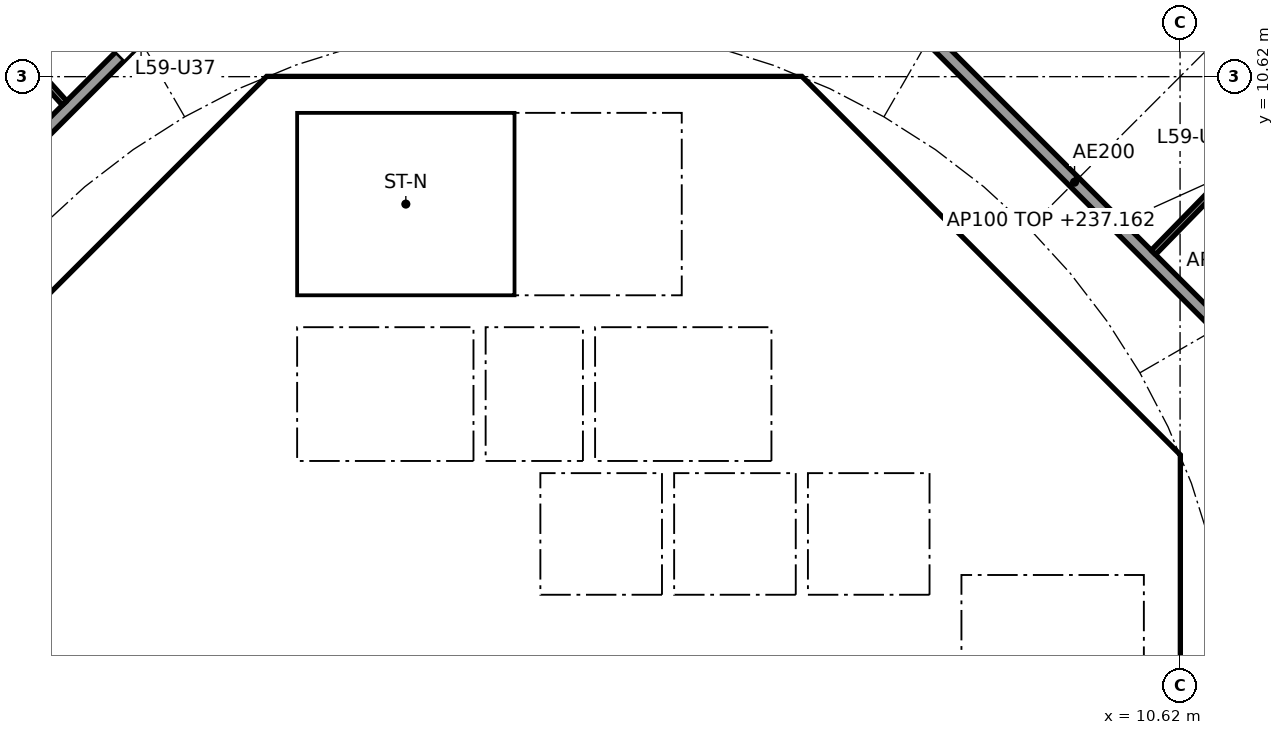
"""IFC4 building model, lengths in metres.
Left out: names, types, materials, properties, quantities, classifications, styles, units other than length and angle.
Written with IfcOpenShell. Run it as: python <this file> out.ifc"""

import sys

from ifc_helpers import new_model, si_unit, direction, frame, frame_2d, origin, place, context, subcontext, project, spatial, polyline, rectangle, outline, extrude, element, fill, save


model = new_model("IFC4")
c1 = context("Model", 3, precision=1e-05, world=origin(), true_north=direction((0.0, 1.0)))
c2 = subcontext(c1, "Body", "Model", "MODEL_VIEW")
j1 = project(units=[si_unit("LENGTHUNIT", "METRE"), si_unit("PLANEANGLEUNIT", "RADIAN")], contexts=[c1])
p1 = place(None, origin())
s1 = spatial("IfcSite", under=j1, at=p1, CompositionType="ELEMENT")
p2 = place(p1, origin())
s2 = spatial("IfcBuilding", under=s1, at=p2, CompositionType="ELEMENT")
p3 = place(p2, frame((0.0, 0.0, 234.4)))
s3 = spatial("IfcBuildingStorey", under=s2, at=p3, CompositionType="ELEMENT", Elevation=234.4)
p4 = place(p3, frame((9.988, 4.613, 0.0), z_axis=(0.0, 0.0, 1.0), x_axis=(-0.707106781187, 0.707106781187, 0.0)))
e1 = element("IfcWall", 1, at=p4, inside=s3, PredefinedType="SHEAR", context=c2, shape_type="SweptSolid", body=[
    extrude(rectangle(XDim=7.602, YDim=0.6, at=frame_2d((3.801, 0.0))), origin(), (0.0, 0.0, 1.0), 3.44),
])
p5 = place(p4, frame((3.201, 0.0, 0.0)))
e2 = element("IfcOpeningElement", 2, at=p5, cuts=e1, PredefinedType="OPENING", context=c2, shape_type="SweptSolid", body=[
    extrude(rectangle(XDim=1.2, YDim=2.1, at=frame_2d((0.6, 1.05))), frame((0.0, 0.31, 0.0), z_axis=(0.0, -1.0, 0.0), x_axis=(1.0, 0.0, 0.0)), (0.0, 0.0, 1.0), 0.62),
])
p6 = place(p3, frame((-4.613, 9.988, 0.0), z_axis=(0.0, 0.0, 1.0), x_axis=(-0.707106781187, -0.707106781187, 0.0)))
e3 = element("IfcWall", 3, at=p6, inside=s3, PredefinedType="SHEAR", context=c2, shape_type="SweptSolid", body=[
    extrude(rectangle(XDim=7.602, YDim=0.6, at=frame_2d((3.801, 0.0))), origin(), (0.0, 0.0, 1.0), 3.44),
])
p7 = place(p6, frame((0.351, 0.0, 0.0)))
e4 = element("IfcOpeningElement", 4, at=p7, cuts=e3, PredefinedType="OPENING", context=c2, shape_type="SweptSolid", body=[
    extrude(rectangle(XDim=1.1, YDim=2.1, at=frame_2d((0.55, 1.05))), frame((0.0, 0.31, 0.0), z_axis=(0.0, -1.0, 0.0), x_axis=(1.0, 0.0, 0.0)), (0.0, 0.0, 1.0), 0.62),
])
p8 = place(p3, frame((-7.0, 4.1, 0.0), z_axis=(0.0, 0.0, 1.0), x_axis=(0.0, 1.0, 0.0)))
e5 = element("IfcWall", 5, at=p8, inside=s3, PredefinedType="PARTITIONING", context=c2, shape_type="SweptSolid", body=[
    extrude(rectangle(XDim=2.927, YDim=0.15, at=frame_2d((1.463, 0.0))), origin(), (0.0, 0.0, 1.0), 3.44),
])
p9 = place(p8, frame((1.051, 0.0, 0.0)))
e6 = element("IfcOpeningElement", 6, at=p9, cuts=e5, PredefinedType="OPENING", context=c2, shape_type="SweptSolid", body=[
    extrude(rectangle(XDim=0.9, YDim=2.1, at=frame_2d((0.45, 1.05))), frame((0.0, 0.085, 0.0), z_axis=(0.0, -1.0, 0.0), x_axis=(1.0, 0.0, 0.0)), (0.0, 0.0, 1.0), 0.17),
])
p10 = place(p3, frame((4.0, 4.3, 0.0), z_axis=(0.0, 0.0, 1.0), x_axis=(0.0, 1.0, 0.0)))
e7 = element("IfcWall", 7, at=p10, inside=s3, PredefinedType="SOLIDWALL", context=c2, shape_type="SweptSolid", body=[
    extrude(rectangle(XDim=2.2, YDim=0.2, at=frame_2d((1.1, 0.0))), origin(), (0.0, 0.0, 1.0), 3.44),
])
p11 = place(p10, frame((0.55, 0.0, 0.0)))
e8 = element("IfcOpeningElement", 8, at=p11, cuts=e7, PredefinedType="OPENING", context=c2, shape_type="SweptSolid", body=[
    extrude(rectangle(XDim=1.1, YDim=2.1, at=frame_2d((0.55, 1.05))), frame((0.0, 0.11, 0.0), z_axis=(0.0, -1.0, 0.0), x_axis=(1.0, 0.0, 0.0)), (0.0, 0.0, 1.0), 0.22),
])
p12 = place(p3, frame((-4.0, 4.3, 0.0), z_axis=(0.0, 0.0, 1.0), x_axis=(0.0, 1.0, 0.0)))
e9 = element("IfcWall", 9, at=p12, inside=s3, PredefinedType="SOLIDWALL", context=c2, shape_type="SweptSolid", body=[
    extrude(rectangle(XDim=2.2, YDim=0.2, at=frame_2d((1.1, 0.0))), origin(), (0.0, 0.0, 1.0), 3.44),
])
p13 = place(p12, frame((0.55, 0.0, 0.0)))
e10 = element("IfcOpeningElement", 10, at=p13, cuts=e9, PredefinedType="OPENING", context=c2, shape_type="SweptSolid", body=[
    extrude(rectangle(XDim=1.1, YDim=2.1, at=frame_2d((0.55, 1.05))), frame((0.0, 0.11, 0.0), z_axis=(0.0, -1.0, 0.0), x_axis=(1.0, 0.0, 0.0)), (0.0, 0.0, 1.0), 0.22),
])
p14 = place(p3, frame((-6.7, 2.0, 0.0), z_axis=(0.0, 0.0, 1.0), x_axis=(1.0, 0.0, 0.0)))
e11 = element("IfcWall", 11, at=p14, inside=s3, PredefinedType="SOLIDWALL", context=c2, shape_type="SweptSolid", body=[
    extrude(rectangle(XDim=13.4, YDim=0.2, at=frame_2d((6.7, 0.0))), origin(), (0.0, 0.0, 1.0), 3.44),
])
p15 = place(p14, frame((7.25, 0.0, 0.0)))
e12 = element("IfcOpeningElement", 12, at=p15, cuts=e11, PredefinedType="OPENING", context=c2, shape_type="SweptSolid", body=[
    extrude(rectangle(XDim=1.1, YDim=2.1, at=frame_2d((0.55, 1.05))), frame((0.0, 0.11, 0.0), z_axis=(0.0, -1.0, 0.0), x_axis=(1.0, 0.0, 0.0)), (0.0, 0.0, 1.0), 0.22),
])
p16 = place(p14, frame((9.45, 0.0, 0.0)))
e13 = element("IfcOpeningElement", 13, at=p16, cuts=e11, PredefinedType="OPENING", context=c2, shape_type="SweptSolid", body=[
    extrude(rectangle(XDim=1.1, YDim=2.1, at=frame_2d((0.55, 1.05))), frame((0.0, 0.11, 0.0), z_axis=(0.0, -1.0, 0.0), x_axis=(1.0, 0.0, 0.0)), (0.0, 0.0, 1.0), 0.22),
])
p17 = place(p14, frame((2.95, 0.0, 0.0)))
e14 = element("IfcOpeningElement", 14, at=p17, cuts=e11, PredefinedType="OPENING", context=c2, shape_type="SweptSolid", body=[
    extrude(rectangle(XDim=0.9, YDim=2.1, at=frame_2d((0.45, 1.05))), frame((0.0, 0.11, 0.0), z_axis=(0.0, -1.0, 0.0), x_axis=(1.0, 0.0, 0.0)), (0.0, 0.0, 1.0), 0.22),
])
p18 = place(p3, frame((6.7, 4.0, 0.0), z_axis=(0.0, 0.0, 1.0), x_axis=(1.0, 0.0, 0.0)))
e15 = element("IfcWall", 15, at=p18, inside=s3, PredefinedType="SOLIDWALL", context=c2, shape_type="SweptSolid", body=[
    extrude(rectangle(XDim=3.325, YDim=0.2, at=frame_2d((1.662, 0.0))), origin(), (0.0, 0.0, 1.0), 3.44),
])
p19 = place(p18, frame((1.25, 0.0, 0.0)))
e16 = element("IfcOpeningElement", 16, at=p19, cuts=e15, PredefinedType="OPENING", context=c2, shape_type="SweptSolid", body=[
    extrude(rectangle(XDim=1.1, YDim=2.1, at=frame_2d((0.55, 1.05))), frame((0.0, 0.11, 0.0), z_axis=(0.0, -1.0, 0.0), x_axis=(1.0, 0.0, 0.0)), (0.0, 0.0, 1.0), 0.22),
])
p20 = place(p3, frame((4.0, 7.025, 0.0), z_axis=(0.0, 0.0, 1.0), x_axis=(0.0, 1.0, 0.0)))
e17 = element("IfcWall", 17, at=p20, inside=s3, PredefinedType="SOLIDWALL", context=c2, shape_type="SweptSolid", body=[
    extrude(rectangle(XDim=3.0, YDim=0.2, at=frame_2d((1.5, 0.0))), origin(), (0.0, 0.0, 1.0), 3.44),
])
p21 = place(p20, frame((0.925, 0.0, 0.0)))
e18 = element("IfcOpeningElement", 18, at=p21, cuts=e17, PredefinedType="OPENING", context=c2, shape_type="SweptSolid", body=[
    extrude(rectangle(XDim=1.1, YDim=2.1, at=frame_2d((0.55, 1.05))), frame((0.0, 0.11, 0.0), z_axis=(0.0, -1.0, 0.0), x_axis=(1.0, 0.0, 0.0)), (0.0, 0.0, 1.0), 0.22),
])
p22 = place(p3, origin())
e19 = element("IfcWall", 19, at=p22, inside=s3, PredefinedType="SHEAR", context=c2, shape_type="SweptSolid", body=[
    extrude(outline(polyline([(-4.152, 10.025), (-4.401, 9.776), (-4.825, 10.2), (-4.401, 10.625), (4.401, 10.625), (4.825, 10.2), (4.401, 9.776), (4.152, 10.025), (-4.152, 10.025)])), origin(), (0.0, 0.0, 1.0), 3.44),
])
p23 = place(p3, origin())
e20 = element("IfcWall", 20, at=p23, inside=s3, PredefinedType="SHEAR", context=c2, shape_type="SweptSolid", body=[
    extrude(outline(polyline([(9.776, -4.401), (10.025, -4.152), (10.025, -3.801), (10.025, 4.152), (9.776, 4.401), (10.2, 4.825), (10.625, 4.401), (10.625, -4.401), (10.2, -4.825), (9.776, -4.401)])), origin(), (0.0, 0.0, 1.0), 3.44),
])
for number, where, z_axis, x_axis in (
    (21, (-0.9, 4.3, 0.0), (0.0, 0.0, 1.0), (0.0, 1.0, 0.0)),
    (22, (0.9, 4.3, 0.0), (0.0, 0.0, 1.0), (0.0, 1.0, 0.0)),
):
    element("IfcWall", number, at=place(p3, frame(where, z_axis=z_axis, x_axis=x_axis)), inside=s3, PredefinedType="SOLIDWALL", context=c2, shape_type="SweptSolid", body=[
        extrude(rectangle(XDim=2.2, YDim=0.2, at=frame_2d((1.1, 0.0))), origin(), (0.0, 0.0, 1.0), 3.44),
    ])
p24 = place(p3, origin())
e23 = element("IfcWall", 23, at=p24, inside=s3, PredefinedType="SOLIDWALL", context=c2, shape_type="SweptSolid", body=[
    extrude(outline(polyline([(-6.7, 4.3), (6.7, 4.3), (6.7, 2.1), (6.5, 2.1), (6.5, 4.1), (4.5, 4.1), (4.5, 2.1), (4.3, 2.1), (4.3, 4.1), (2.3, 4.1), (2.3, 2.1), (2.1, 2.1), (2.1, 4.1), (0.1, 4.1), (0.1, 2.1), (-0.1, 2.1), (-0.1, 4.1), (-6.5, 4.1), (-6.5, 2.1), (-6.7, 2.1), (-6.7, 4.3)])), origin(), (0.0, 0.0, 1.0), 3.44),
])
p25 = place(p3, frame((-10.025, 4.0, 0.0), z_axis=(0.0, 0.0, 1.0), x_axis=(1.0, 0.0, 0.0)))
e24 = element("IfcWall", 24, at=p25, inside=s3, PredefinedType="PARTITIONING", context=c2, shape_type="SweptSolid", body=[
    extrude(rectangle(XDim=3.325, YDim=0.2, at=frame_2d((1.662, 0.0))), origin(), (0.0, 0.0, 1.0), 3.44),
])
p26 = place(p3, origin())
e25 = element("IfcWall", 25, at=p26, inside=s3, PredefinedType="SOLIDWALL", context=c2, shape_type="SweptSolid", body=[
    extrude(outline(polyline([(-3.9, 7.025), (-4.1, 7.025), (-4.1, 10.025), (-3.9, 10.025), (-3.9, 7.025)])), origin(), (0.0, 0.0, 1.0), 3.44),
])
p27 = place(p3, origin())
e26 = element("IfcWall", 26, at=p27, inside=s3, PredefinedType="SOLIDWALL", context=c2, shape_type="SweptSolid", body=[
    extrude(outline(polyline([(4.1, 6.5), (-4.1, 6.5), (-4.1, 7.025), (4.1, 7.025), (4.1, 6.5)])), origin(), (0.0, 0.0, 1.0), 3.44),
])
p28 = place(p3, origin())
e27 = element("IfcWall", 27, at=p28, inside=s3, PredefinedType="SOLIDWALL", context=c2, shape_type="SweptSolid", body=[
    extrude(outline(polyline([(7.025, -3.9), (6.7, -3.9), (6.7, 3.9), (7.025, 3.9), (7.025, -3.9)])), origin(), (0.0, 0.0, 1.0), 3.44),
])
p29 = place(p3, frame((12.635, 5.134, 0.0), z_axis=(0.0, 0.0, 1.0), x_axis=(-0.707106781187, 0.707106781187, 0.0)))
e28 = element("IfcWall", 28, at=p29, inside=s3, PredefinedType="PARTITIONING", context=c2, shape_type="SweptSolid", body=[
    extrude(rectangle(XDim=10.609, YDim=0.2, at=frame_2d((5.305, 0.0))), origin(), (0.0, 0.0, 1.0), 3.44),
])
p30 = place(p3, frame((-5.275, 12.494, 0.0), z_axis=(0.0, 0.0, 1.0), x_axis=(-0.707106781187, -0.707106781187, 0.0)))
e29 = element("IfcWall", 29, at=p30, inside=s3, PredefinedType="PARTITIONING", context=c2, shape_type="SweptSolid", body=[
    extrude(rectangle(XDim=10.209, YDim=0.2, at=frame_2d((5.104, 0.0))), origin(), (0.0, 0.0, 1.0), 3.44),
])
p31 = place(p30, frame((1.185, 0.0, 0.0)))
e30 = element("IfcOpeningElement", 30, at=p31, cuts=e29, PredefinedType="OPENING", context=c2, shape_type="SweptSolid", body=[
    extrude(rectangle(XDim=1.0, YDim=2.1, at=frame_2d((0.5, 1.05))), frame((0.0, 0.11, 0.0), z_axis=(0.0, -1.0, 0.0), x_axis=(1.0, 0.0, 0.0)), (0.0, 0.0, 1.0), 0.22),
])
p32 = place(p3, frame((10.181, 7.729, 0.0), z_axis=(0.0, 0.0, 1.0), x_axis=(0.69841402561, 0.71569396311, 0.0)))
e31 = element("IfcWall", 31, at=p32, inside=s3, PredefinedType="PARTITIONING", context=c2, shape_type="SweptSolid", body=[
    extrude(rectangle(XDim=3.688, YDim=0.1, at=frame_2d((1.844, 0.0))), origin(), (0.0, 0.0, 1.0), 2.762),
])
p33 = place(p32, frame((1.394, 0.0, 0.0)))
e32 = element("IfcOpeningElement", 32, at=p33, cuts=e31, PredefinedType="OPENING", context=c2, shape_type="SweptSolid", body=[
    extrude(rectangle(XDim=0.9, YDim=2.1, at=frame_2d((0.45, 1.05))), frame((0.0, 0.06, 0.0), z_axis=(0.0, -1.0, 0.0), x_axis=(1.0, 0.0, 0.0)), (0.0, 0.0, 1.0), 0.12),
])
p34 = place(p3, frame((12.759, 10.443, 0.0), z_axis=(0.0, 0.0, 1.0), x_axis=(-0.642225196965, 0.766516011825, 0.0)))
e33 = element("IfcWall", 33, at=p34, inside=s3, PredefinedType="PARTITIONING", context=c2, shape_type="SweptSolid", body=[
    extrude(rectangle(XDim=4.361, YDim=0.1, at=frame_2d((2.18, 0.0))), origin(), (0.0, 0.0, 1.0), 2.837),
])
p35 = place(p3, frame((-7.725, 10.186, 0.0), z_axis=(0.0, 0.0, 1.0), x_axis=(-0.669819599194, 0.742523874725, 0.0)))
e34 = element("IfcWall", 34, at=p35, inside=s3, PredefinedType="PARTITIONING", context=c2, shape_type="SweptSolid", body=[
    extrude(rectangle(XDim=10.282, YDim=0.1, at=frame_2d((5.141, 0.0))), origin(), (0.0, 0.0, 1.0), 2.762),
])
p36 = place(p35, frame((2.0, 0.0, 0.0)))
e35 = element("IfcOpeningElement", 35, at=p36, cuts=e34, PredefinedType="OPENING", context=c2, shape_type="SweptSolid", body=[
    extrude(rectangle(XDim=0.9, YDim=2.1, at=frame_2d((0.45, 1.05))), frame((0.0, 0.06, 0.0), z_axis=(0.0, -1.0, 0.0), x_axis=(1.0, 0.0, 0.0)), (0.0, 0.0, 1.0), 0.12),
])
p37 = place(p35, frame((7.116, 0.0, 0.0)))
e36 = element("IfcOpeningElement", 36, at=p37, cuts=e34, PredefinedType="OPENING", context=c2, shape_type="SweptSolid", body=[
    extrude(rectangle(XDim=0.9, YDim=2.1, at=frame_2d((0.45, 1.05))), frame((0.0, 0.06, 0.0), z_axis=(0.0, -1.0, 0.0), x_axis=(1.0, 0.0, 0.0)), (0.0, 0.0, 1.0), 0.12),
])
p38 = place(p15, origin())
e37 = element("IfcDoor", 37, at=p38, inside=s3, OperationType="DOUBLE_DOOR_SLIDING", PredefinedType="DOOR", context=c2, shape_type="SweptSolid", body=[
    extrude(rectangle(XDim=1.1, YDim=2.1, at=frame_2d((0.55, 1.05))), frame((0.0, 0.025, 0.0), z_axis=(0.0, -1.0, 0.0), x_axis=(1.0, 0.0, 0.0)), (0.0, 0.0, 1.0), 0.05),
])
fill(e12, e37)
p39 = place(p16, origin())
e38 = element("IfcDoor", 38, at=p39, inside=s3, OperationType="DOUBLE_DOOR_SLIDING", PredefinedType="DOOR", context=c2, shape_type="SweptSolid", body=[
    extrude(rectangle(XDim=1.1, YDim=2.1, at=frame_2d((0.55, 1.05))), frame((0.0, 0.025, 0.0), z_axis=(0.0, -1.0, 0.0), x_axis=(1.0, 0.0, 0.0)), (0.0, 0.0, 1.0), 0.05),
])
fill(e13, e38)
p40 = place(p11, origin())
e39 = element("IfcDoor", 39, at=p40, inside=s3, OperationType="DOUBLE_DOOR_SLIDING", PredefinedType="DOOR", context=c2, shape_type="SweptSolid", body=[
    extrude(rectangle(XDim=1.1, YDim=2.1, at=frame_2d((0.55, 1.05))), frame((0.0, 0.025, 0.0), z_axis=(0.0, -1.0, 0.0), x_axis=(1.0, 0.0, 0.0)), (0.0, 0.0, 1.0), 0.05),
])
fill(e8, e39)
p41 = place(p13, origin())
e40 = element("IfcDoor", 40, at=p41, inside=s3, OperationType="DOUBLE_DOOR_SLIDING", PredefinedType="DOOR", context=c2, shape_type="SweptSolid", body=[
    extrude(rectangle(XDim=1.1, YDim=2.1, at=frame_2d((0.55, 1.05))), frame((0.0, 0.025, 0.0), z_axis=(0.0, -1.0, 0.0), x_axis=(1.0, 0.0, 0.0)), (0.0, 0.0, 1.0), 0.05),
])
fill(e10, e40)
p42 = place(p19, frame((1.1, 0.0, 0.0), x_axis=(-1.0, 0.0, 0.0)))
e41 = element("IfcDoor", 41, at=p42, inside=s3, OperationType="SINGLE_SWING_LEFT", PredefinedType="DOOR", context=c2, shape_type="SweptSolid", body=[
    extrude(rectangle(XDim=1.1, YDim=2.1, at=frame_2d((0.55, 1.05))), frame((0.0, 0.025, 0.0), z_axis=(0.0, -1.0, 0.0), x_axis=(1.0, 0.0, 0.0)), (0.0, 0.0, 1.0), 0.05),
])
fill(e16, e41)
p43 = place(p21, origin())
e42 = element("IfcDoor", 42, at=p43, inside=s3, OperationType="SINGLE_SWING_RIGHT", PredefinedType="DOOR", context=c2, shape_type="SweptSolid", body=[
    extrude(rectangle(XDim=1.1, YDim=2.1, at=frame_2d((0.55, 1.05))), frame((0.0, 0.025, 0.0), z_axis=(0.0, -1.0, 0.0), x_axis=(1.0, 0.0, 0.0)), (0.0, 0.0, 1.0), 0.05),
])
fill(e18, e42)
p44 = place(p9, origin())
e43 = element("IfcDoor", 43, at=p44, inside=s3, OperationType="SINGLE_SWING_LEFT", PredefinedType="DOOR", context=c2, shape_type="SweptSolid", body=[
    extrude(rectangle(XDim=0.9, YDim=2.1, at=frame_2d((0.45, 1.05))), frame((0.0, 0.025, 0.0), z_axis=(0.0, -1.0, 0.0), x_axis=(1.0, 0.0, 0.0)), (0.0, 0.0, 1.0), 0.05),
])
fill(e6, e43)
p45 = place(p17, origin())
e44 = element("IfcDoor", 44, at=p45, inside=s3, OperationType="SINGLE_SWING_RIGHT", PredefinedType="DOOR", context=c2, shape_type="SweptSolid", body=[
    extrude(rectangle(XDim=0.9, YDim=2.1, at=frame_2d((0.45, 1.05))), frame((0.0, 0.025, 0.0), z_axis=(0.0, -1.0, 0.0), x_axis=(1.0, 0.0, 0.0)), (0.0, 0.0, 1.0), 0.05),
])
fill(e14, e44)
p46 = place(p5, origin())
e45 = element("IfcDoor", 45, at=p46, inside=s3, OperationType="SINGLE_SWING_LEFT", PredefinedType="DOOR", context=c2, shape_type="SweptSolid", body=[
    extrude(rectangle(XDim=1.2, YDim=2.1, at=frame_2d((0.6, 1.05))), frame((0.0, 0.025, 0.0), z_axis=(0.0, -1.0, 0.0), x_axis=(1.0, 0.0, 0.0)), (0.0, 0.0, 1.0), 0.05),
])
fill(e2, e45)
p47 = place(p7, origin())
e46 = element("IfcDoor", 46, at=p47, inside=s3, OperationType="SINGLE_SWING_LEFT", PredefinedType="DOOR", context=c2, shape_type="SweptSolid", body=[
    extrude(rectangle(XDim=1.1, YDim=2.1, at=frame_2d((0.55, 1.05))), frame((0.0, 0.025, 0.0), z_axis=(0.0, -1.0, 0.0), x_axis=(1.0, 0.0, 0.0)), (0.0, 0.0, 1.0), 0.05),
])
fill(e4, e46)
p48 = place(p31, frame((1.0, 0.0, 0.0), x_axis=(-1.0, 0.0, 0.0)))
e47 = element("IfcDoor", 47, at=p48, inside=s3, OperationType="SINGLE_SWING_RIGHT", PredefinedType="DOOR", context=c2, shape_type="SweptSolid", body=[
    extrude(rectangle(XDim=1.0, YDim=2.1, at=frame_2d((0.5, 1.05))), frame((0.0, 0.025, 0.0), z_axis=(0.0, -1.0, 0.0), x_axis=(1.0, 0.0, 0.0)), (0.0, 0.0, 1.0), 0.05),
])
fill(e30, e47)
save(model, sys.argv[1])
